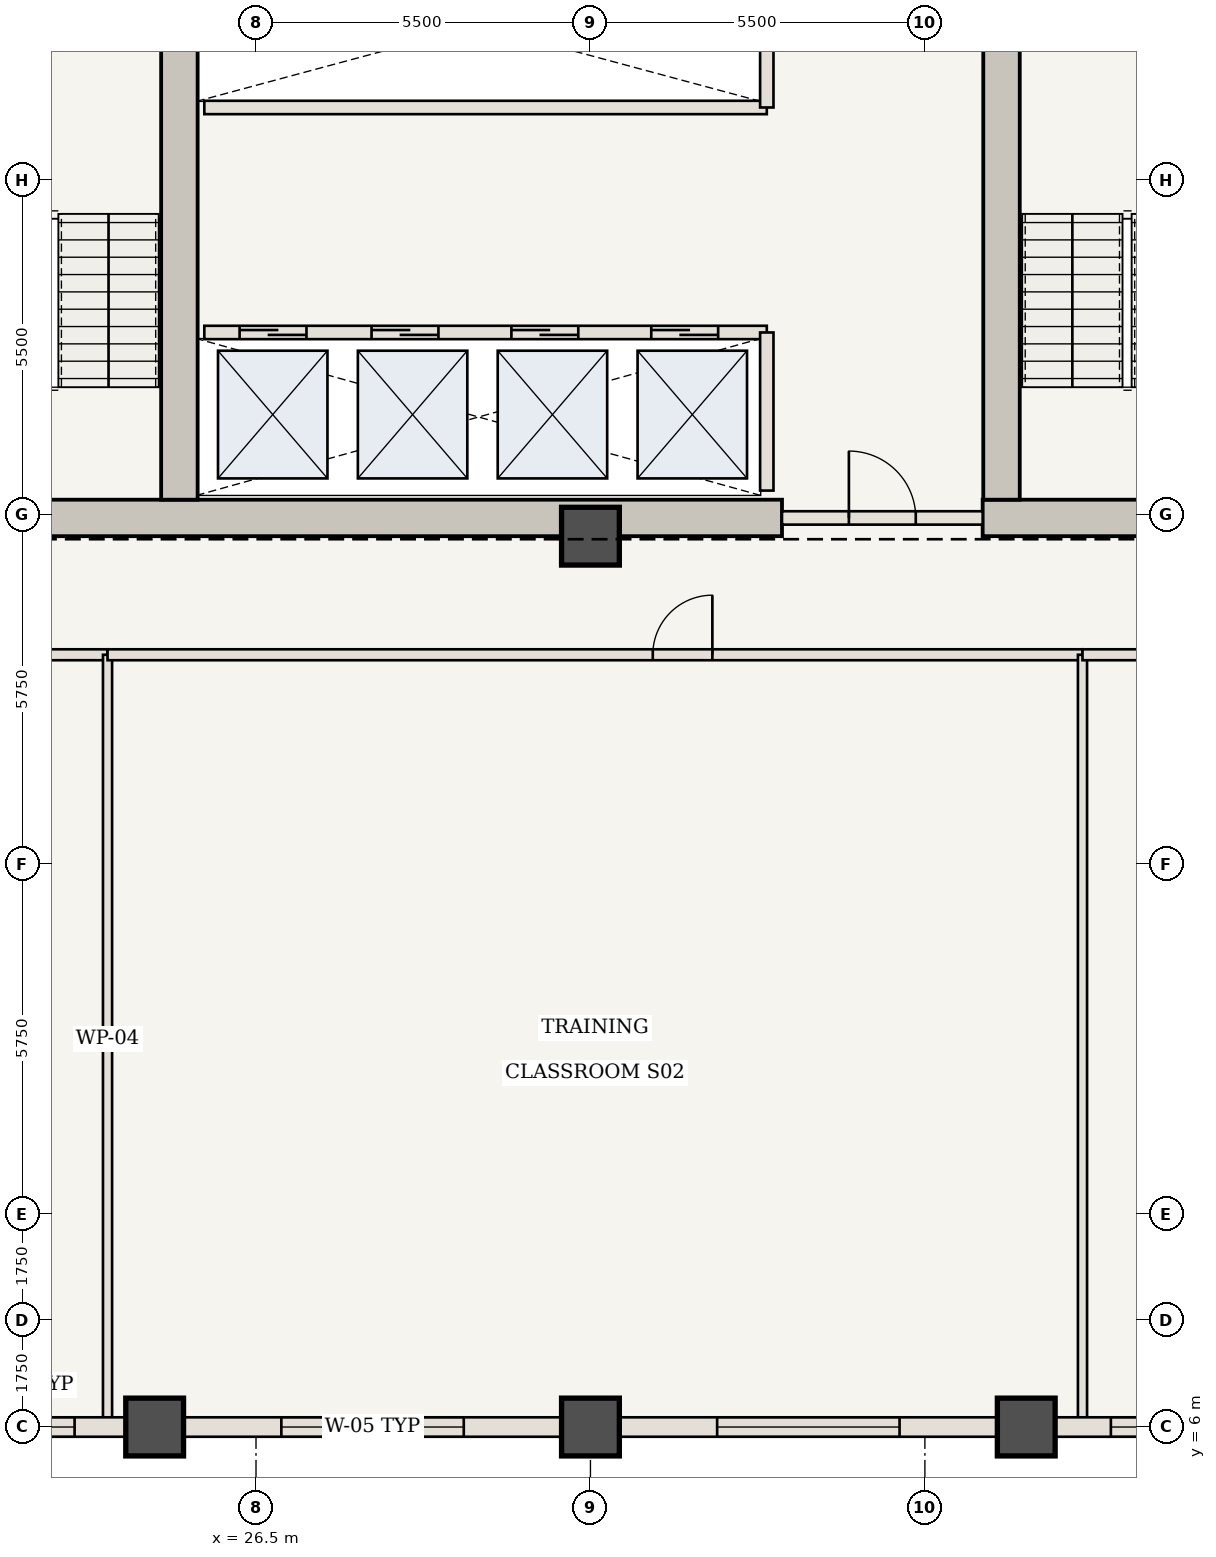
"""IFC4 building model, lengths in metres.
Left out: names, types, materials, properties, quantities, classifications, styles, units other than length and angle.
Written with IfcOpenShell. Run it as: python <this file> out.ifc"""

import sys

from ifc_helpers import new_model, si_unit, direction, frame, frame_2d, origin, origin_2d, place, context, subcontext, project, spatial, rectangle, extrude, element, fill, save


model = new_model("IFC4")
c1 = context("Model", 3, precision=1e-05, world=origin(), true_north=direction((0.0, 1.0)))
c2 = subcontext(c1, "Body", "Model", "MODEL_VIEW")
j1 = project(units=[si_unit("LENGTHUNIT", "METRE"), si_unit("PLANEANGLEUNIT", "RADIAN")], contexts=[c1])
p1 = place(None, origin())
s1 = spatial("IfcSite", under=j1, at=p1, CompositionType="ELEMENT")
p2 = place(p1, origin())
s2 = spatial("IfcBuilding", under=s1, at=p2, CompositionType="ELEMENT")
p3 = place(p2, frame((0.0, 0.0, 133.7)))
s3 = spatial("IfcBuildingStorey", under=s2, at=p3, CompositionType="ELEMENT", Elevation=133.7)
p4 = place(p3, frame((21.41, 20.95, 0.0), z_axis=(0.0, 0.0, 1.0), x_axis=(1.0, 0.0, 0.0)))
e1 = element("IfcWall", 1, at=p4, inside=s3, PredefinedType="SHEAR", context=c2, shape_type="SweptSolid", body=[
    extrude(rectangle(XDim=13.74, YDim=0.6, at=frame_2d((6.87, 0.0))), origin(), (0.0, 0.0, 1.0), 3.85),
])
p5 = place(p3, frame((38.45, 20.95, 0.0), z_axis=(0.0, 0.0, 1.0), x_axis=(1.0, 0.0, 0.0)))
e2 = element("IfcWall", 2, at=p5, inside=s3, PredefinedType="SHEAR", context=c2, shape_type="SweptSolid", body=[
    extrude(rectangle(XDim=4.14, YDim=0.6, at=frame_2d((2.07, 0.0))), origin(), (0.0, 0.0, 1.0), 3.85),
])
for number, where, z_axis, x_axis in (
    (3, (25.24, 21.25, 0.0), (0.0, 0.0, 1.0), (0.0, 1.0, 0.0)),
    (4, (38.76, 21.25, 0.0), (0.0, 0.0, 1.0), (0.0, 1.0, 0.0)),
):
    element("IfcWall", number, at=place(p3, frame(where, z_axis=z_axis, x_axis=x_axis)), inside=s3, PredefinedType="SHEAR", context=c2, shape_type="SweptSolid", body=[
        extrude(rectangle(XDim=9.35, YDim=0.6, at=frame_2d((4.675, 0.0))), origin(), (0.0, 0.0, 1.0), 3.85),
    ])
for number, where, z_axis, x_axis in (
    (5, (32.0, 20.65, 0.0), (0.0, 0.0, 1.0), (1.0, 0.0, 0.0)),
    (6, (24.833, 6.0, 0.0), (0.0, 0.0, 1.0), (1.0, 0.0, 0.0)),
    (7, (32.0, 6.0, 0.0), (0.0, 0.0, 1.0), (1.0, 0.0, 0.0)),
    (8, (39.167, 6.0, 0.0), (0.0, 0.0, 1.0), (1.0, 0.0, 0.0)),
):
    element("IfcColumn", number, at=place(p3, frame(where, z_axis=z_axis, x_axis=x_axis)), inside=s3, PredefinedType="COLUMN", context=c2, shape_type="SweptSolid", body=[
        extrude(rectangle(XDim=0.95, YDim=0.95, at=origin_2d()), origin(), (0.0, 0.0, 1.0), 3.85),
    ])
p6 = place(p3, frame((35.15, 20.95, 0.0), z_axis=(0.0, 0.0, 1.0), x_axis=(1.0, 0.0, 0.0)))
e9 = element("IfcWall", 9, at=p6, inside=s3, PredefinedType="STANDARD", context=c2, shape_type="SweptSolid", body=[
    extrude(rectangle(XDim=3.3, YDim=0.22, at=frame_2d((1.65, 0.0))), origin(), (0.0, 0.0, 1.0), 3.685),
])
p7 = place(p6, frame((1.1, 0.0, 0.0)))
e10 = element("IfcOpeningElement", 10, at=p7, cuts=e9, PredefinedType="OPENING", context=c2, shape_type="SweptSolid", body=[
    extrude(rectangle(XDim=1.1, YDim=2.15, at=frame_2d((0.55, 1.075))), frame((0.0, 0.12, 0.0), z_axis=(0.0, -1.0, 0.0), x_axis=(1.0, 0.0, 0.0)), (0.0, 0.0, 1.0), 0.24),
])
p8 = place(p3, frame((25.65, 24.0, 0.0), z_axis=(0.0, 0.0, 1.0), x_axis=(1.0, 0.0, 0.0)))
e11 = element("IfcWall", 11, at=p8, inside=s3, PredefinedType="STANDARD", context=c2, shape_type="SweptSolid", body=[
    extrude(rectangle(XDim=9.25, YDim=0.22, at=frame_2d((4.625, 0.0))), origin(), (0.0, 0.0, 1.0), 3.685),
])
p9 = place(p8, frame((0.58, 0.0, 0.0)))
e12 = element("IfcOpeningElement", 12, at=p9, cuts=e11, PredefinedType="OPENING", context=c2, shape_type="SweptSolid", body=[
    extrude(rectangle(XDim=1.1, YDim=2.15, at=frame_2d((0.55, 1.075))), frame((0.0, 0.12, 0.0), z_axis=(0.0, -1.0, 0.0), x_axis=(1.0, 0.0, 0.0)), (0.0, 0.0, 1.0), 0.24),
])
p10 = place(p8, frame((2.75, 0.0, 0.0)))
e13 = element("IfcOpeningElement", 13, at=p10, cuts=e11, PredefinedType="OPENING", context=c2, shape_type="SweptSolid", body=[
    extrude(rectangle(XDim=1.1, YDim=2.15, at=frame_2d((0.55, 1.075))), frame((0.0, 0.12, 0.0), z_axis=(0.0, -1.0, 0.0), x_axis=(1.0, 0.0, 0.0)), (0.0, 0.0, 1.0), 0.24),
])
p11 = place(p8, frame((5.05, 0.0, 0.0)))
e14 = element("IfcOpeningElement", 14, at=p11, cuts=e11, PredefinedType="OPENING", context=c2, shape_type="SweptSolid", body=[
    extrude(rectangle(XDim=1.1, YDim=2.15, at=frame_2d((0.55, 1.075))), frame((0.0, 0.12, 0.0), z_axis=(0.0, -1.0, 0.0), x_axis=(1.0, 0.0, 0.0)), (0.0, 0.0, 1.0), 0.24),
])
p12 = place(p8, frame((7.35, 0.0, 0.0)))
e15 = element("IfcOpeningElement", 15, at=p12, cuts=e11, PredefinedType="OPENING", context=c2, shape_type="SweptSolid", body=[
    extrude(rectangle(XDim=1.1, YDim=2.15, at=frame_2d((0.55, 1.075))), frame((0.0, 0.12, 0.0), z_axis=(0.0, -1.0, 0.0), x_axis=(1.0, 0.0, 0.0)), (0.0, 0.0, 1.0), 0.24),
])
p13 = place(p3, frame((34.9, 21.4, 0.0), z_axis=(0.0, 0.0, 1.0), x_axis=(0.0, 1.0, 0.0)))
e16 = element("IfcWall", 16, at=p13, inside=s3, PredefinedType="STANDARD", context=c2, shape_type="SweptSolid", body=[
    extrude(rectangle(XDim=2.6, YDim=0.22, at=frame_2d((1.3, 0.0))), origin(), (0.0, 0.0, 1.0), 3.685),
])
p14 = place(p3, frame((25.65, 27.7, 0.0), z_axis=(0.0, 0.0, 1.0), x_axis=(1.0, 0.0, 0.0)))
e17 = element("IfcWall", 17, at=p14, inside=s3, PredefinedType="STANDARD", context=c2, shape_type="SweptSolid", body=[
    extrude(rectangle(XDim=9.25, YDim=0.22, at=frame_2d((4.625, 0.0))), origin(), (0.0, 0.0, 1.0), 3.685),
])
p15 = place(p3, frame((34.9, 27.7, 0.0), z_axis=(0.0, 0.0, 1.0), x_axis=(0.0, 1.0, 0.0)))
e18 = element("IfcWall", 18, at=p15, inside=s3, PredefinedType="STANDARD", context=c2, shape_type="SweptSolid", body=[
    extrude(rectangle(XDim=2.7, YDim=0.22, at=frame_2d((1.35, 0.0))), origin(), (0.0, 0.0, 1.0), 3.685),
])
p16 = place(p3, frame((10.5, 18.7, 0.0), z_axis=(0.0, 0.0, 1.0), x_axis=(1.0, 0.0, 0.0)))
e19 = element("IfcWall", 19, at=p16, inside=s3, PredefinedType="STANDARD", context=c2, shape_type="SweptSolid", body=[
    extrude(rectangle(XDim=13.558, YDim=0.18, at=frame_2d((6.779, 0.0))), origin(), (0.0, 0.0, 1.0), 3.685),
])
p17 = place(p16, frame((6.279, 0.0, 0.0)))
e20 = element("IfcOpeningElement", 20, at=p17, cuts=e19, PredefinedType="OPENING", context=c2, shape_type="SweptSolid", body=[
    extrude(rectangle(XDim=0.98, YDim=2.2, at=frame_2d((0.49, 1.1))), frame((0.0, 0.1, 0.0), z_axis=(0.0, -1.0, 0.0), x_axis=(1.0, 0.0, 0.0)), (0.0, 0.0, 1.0), 0.2),
])
p18 = place(p3, frame((24.058, 6.06, 0.0), z_axis=(0.0, 0.0, 1.0), x_axis=(0.0, 1.0, 0.0)))
e21 = element("IfcWall", 21, at=p18, inside=s3, PredefinedType="STANDARD", context=c2, shape_type="SweptSolid", body=[
    extrude(rectangle(XDim=12.64, YDim=0.15, at=frame_2d((6.32, 0.0))), origin(), (0.0, 0.0, 1.0), 3.685),
])
p19 = place(p3, frame((24.058, 18.7, 0.0), z_axis=(0.0, 0.0, 1.0), x_axis=(1.0, 0.0, 0.0)))
e22 = element("IfcWall", 22, at=p19, inside=s3, PredefinedType="STANDARD", context=c2, shape_type="SweptSolid", body=[
    extrude(rectangle(XDim=16.033, YDim=0.18, at=frame_2d((8.017, 0.0))), origin(), (0.0, 0.0, 1.0), 3.685),
])
p20 = place(p19, frame((8.967, 0.0, 0.0)))
e23 = element("IfcOpeningElement", 23, at=p20, cuts=e22, PredefinedType="OPENING", context=c2, shape_type="SweptSolid", body=[
    extrude(rectangle(XDim=0.98, YDim=2.2, at=frame_2d((0.49, 1.1))), frame((0.0, 0.1, 0.0), z_axis=(0.0, -1.0, 0.0), x_axis=(1.0, 0.0, 0.0)), (0.0, 0.0, 1.0), 0.2),
])
p21 = place(p3, frame((40.092, 6.06, 0.0), z_axis=(0.0, 0.0, 1.0), x_axis=(0.0, 1.0, 0.0)))
e24 = element("IfcWall", 24, at=p21, inside=s3, PredefinedType="STANDARD", context=c2, shape_type="SweptSolid", body=[
    extrude(rectangle(XDim=12.64, YDim=0.15, at=frame_2d((6.32, 0.0))), origin(), (0.0, 0.0, 1.0), 3.685),
])
p22 = place(p3, frame((40.092, 18.7, 0.0), z_axis=(0.0, 0.0, 1.0), x_axis=(1.0, 0.0, 0.0)))
e25 = element("IfcWall", 25, at=p22, inside=s3, PredefinedType="STANDARD", context=c2, shape_type="SweptSolid", body=[
    extrude(rectangle(XDim=13.408, YDim=0.18, at=frame_2d((6.704, 0.0))), origin(), (0.0, 0.0, 1.0), 3.685),
])
p23 = place(p22, frame((6.204, 0.0, 0.0)))
e26 = element("IfcOpeningElement", 26, at=p23, cuts=e25, PredefinedType="OPENING", context=c2, shape_type="SweptSolid", body=[
    extrude(rectangle(XDim=0.98, YDim=2.2, at=frame_2d((0.49, 1.1))), frame((0.0, 0.1, 0.0), z_axis=(0.0, -1.0, 0.0), x_axis=(1.0, 0.0, 0.0)), (0.0, 0.0, 1.0), 0.2),
])
p24 = place(p3, frame((24.833, 6.0, 0.0), z_axis=(0.0, 0.0, 1.0), x_axis=(-1.0, 0.0, 0.0)))
e27 = element("IfcWall", 27, at=p24, inside=s3, PredefinedType="USERDEFINED", context=c2, shape_type="SweptSolid", body=[
    extrude(rectangle(XDim=7.167, YDim=0.32, at=frame_2d((3.583, 0.0))), origin(), (0.0, 0.0, 1.0), 2.885),
])
p25 = place(p24, frame((1.317, 0.0, 0.85)))
e28 = element("IfcOpeningElement", 28, at=p25, cuts=e27, PredefinedType="OPENING", context=c2, shape_type="SweptSolid", body=[
    extrude(rectangle(XDim=1.6, YDim=1.835, at=frame_2d((0.8, 0.917))), frame((0.0, 0.17, 0.0), z_axis=(0.0, -1.0, 0.0), x_axis=(1.0, 0.0, 0.0)), (0.0, 0.0, 1.0), 0.34),
])
p26 = place(p24, frame((4.175, 0.0, 0.85)))
e29 = element("IfcOpeningElement", 29, at=p26, cuts=e27, PredefinedType="OPENING", context=c2, shape_type="SweptSolid", body=[
    extrude(rectangle(XDim=2.2, YDim=1.835, at=frame_2d((1.1, 0.917))), frame((0.0, 0.17, 0.0), z_axis=(0.0, -1.0, 0.0), x_axis=(1.0, 0.0, 0.0)), (0.0, 0.0, 1.0), 0.34),
])
p27 = place(p3, frame((32.0, 6.0, 0.0), z_axis=(0.0, 0.0, 1.0), x_axis=(-1.0, 0.0, 0.0)))
e30 = element("IfcWall", 30, at=p27, inside=s3, PredefinedType="USERDEFINED", context=c2, shape_type="SweptSolid", body=[
    extrude(rectangle(XDim=7.167, YDim=0.32, at=frame_2d((3.583, 0.0))), origin(), (0.0, 0.0, 1.0), 2.885),
])
p28 = place(p27, frame((2.083, 0.0, 0.85)))
e31 = element("IfcOpeningElement", 31, at=p28, cuts=e30, PredefinedType="OPENING", context=c2, shape_type="SweptSolid", body=[
    extrude(rectangle(XDim=3.0, YDim=1.835, at=frame_2d((1.5, 0.917))), frame((0.0, 0.17, 0.0), z_axis=(0.0, -1.0, 0.0), x_axis=(1.0, 0.0, 0.0)), (0.0, 0.0, 1.0), 0.34),
])
p29 = place(p3, frame((39.167, 6.0, 0.0), z_axis=(0.0, 0.0, 1.0), x_axis=(-1.0, 0.0, 0.0)))
e32 = element("IfcWall", 32, at=p29, inside=s3, PredefinedType="USERDEFINED", context=c2, shape_type="SweptSolid", body=[
    extrude(rectangle(XDim=7.167, YDim=0.32, at=frame_2d((3.583, 0.0))), origin(), (0.0, 0.0, 1.0), 2.885),
])
p30 = place(p29, frame((2.083, 0.0, 0.85)))
e33 = element("IfcOpeningElement", 33, at=p30, cuts=e32, PredefinedType="OPENING", context=c2, shape_type="SweptSolid", body=[
    extrude(rectangle(XDim=3.0, YDim=1.835, at=frame_2d((1.5, 0.917))), frame((0.0, 0.17, 0.0), z_axis=(0.0, -1.0, 0.0), x_axis=(1.0, 0.0, 0.0)), (0.0, 0.0, 1.0), 0.34),
])
p31 = place(p3, frame((46.333, 6.0, 0.0), z_axis=(0.0, 0.0, 1.0), x_axis=(-1.0, 0.0, 0.0)))
e34 = element("IfcWall", 34, at=p31, inside=s3, PredefinedType="USERDEFINED", context=c2, shape_type="SweptSolid", body=[
    extrude(rectangle(XDim=7.167, YDim=0.32, at=frame_2d((3.583, 0.0))), origin(), (0.0, 0.0, 1.0), 2.885),
])
p32 = place(p31, frame((0.792, 0.0, 0.85)))
e35 = element("IfcOpeningElement", 35, at=p32, cuts=e34, PredefinedType="OPENING", context=c2, shape_type="SweptSolid", body=[
    extrude(rectangle(XDim=2.2, YDim=1.835, at=frame_2d((1.1, 0.917))), frame((0.0, 0.17, 0.0), z_axis=(0.0, -1.0, 0.0), x_axis=(1.0, 0.0, 0.0)), (0.0, 0.0, 1.0), 0.34),
])
p33 = place(p31, frame((4.175, 0.0, 0.85)))
e36 = element("IfcOpeningElement", 36, at=p33, cuts=e34, PredefinedType="OPENING", context=c2, shape_type="SweptSolid", body=[
    extrude(rectangle(XDim=1.6, YDim=1.835, at=frame_2d((0.8, 0.917))), frame((0.0, 0.17, 0.0), z_axis=(0.0, -1.0, 0.0), x_axis=(1.0, 0.0, 0.0)), (0.0, 0.0, 1.0), 0.34),
])
p34 = place(p7, origin())
e37 = element("IfcDoor", 37, at=p34, inside=s3, OperationType="SINGLE_SWING_LEFT", PredefinedType="DOOR", context=c2, shape_type="SweptSolid", body=[
    extrude(rectangle(XDim=1.1, YDim=2.15, at=frame_2d((0.55, 1.075))), frame((0.0, 0.025, 0.0), z_axis=(0.0, -1.0, 0.0), x_axis=(1.0, 0.0, 0.0)), (0.0, 0.0, 1.0), 0.05),
])
fill(e10, e37)
p35 = place(p9, origin())
e38 = element("IfcDoor", 38, at=p35, inside=s3, OperationType="DOUBLE_DOOR_SLIDING", PredefinedType="DOOR", context=c2, shape_type="SweptSolid", body=[
    extrude(rectangle(XDim=1.1, YDim=2.15, at=frame_2d((0.55, 1.075))), frame((0.0, 0.025, 0.0), z_axis=(0.0, -1.0, 0.0), x_axis=(1.0, 0.0, 0.0)), (0.0, 0.0, 1.0), 0.05),
])
fill(e12, e38)
p36 = place(p10, origin())
e39 = element("IfcDoor", 39, at=p36, inside=s3, OperationType="DOUBLE_DOOR_SLIDING", PredefinedType="DOOR", context=c2, shape_type="SweptSolid", body=[
    extrude(rectangle(XDim=1.1, YDim=2.15, at=frame_2d((0.55, 1.075))), frame((0.0, 0.025, 0.0), z_axis=(0.0, -1.0, 0.0), x_axis=(1.0, 0.0, 0.0)), (0.0, 0.0, 1.0), 0.05),
])
fill(e13, e39)
p37 = place(p11, origin())
e40 = element("IfcDoor", 40, at=p37, inside=s3, OperationType="DOUBLE_DOOR_SLIDING", PredefinedType="DOOR", context=c2, shape_type="SweptSolid", body=[
    extrude(rectangle(XDim=1.1, YDim=2.15, at=frame_2d((0.55, 1.075))), frame((0.0, 0.025, 0.0), z_axis=(0.0, -1.0, 0.0), x_axis=(1.0, 0.0, 0.0)), (0.0, 0.0, 1.0), 0.05),
])
fill(e14, e40)
p38 = place(p12, origin())
e41 = element("IfcDoor", 41, at=p38, inside=s3, OperationType="DOUBLE_DOOR_SLIDING", PredefinedType="DOOR", context=c2, shape_type="SweptSolid", body=[
    extrude(rectangle(XDim=1.1, YDim=2.15, at=frame_2d((0.55, 1.075))), frame((0.0, 0.025, 0.0), z_axis=(0.0, -1.0, 0.0), x_axis=(1.0, 0.0, 0.0)), (0.0, 0.0, 1.0), 0.05),
])
fill(e15, e41)
p39 = place(p20, origin())
e42 = element("IfcDoor", 42, at=p39, inside=s3, OperationType="SINGLE_SWING_RIGHT", PredefinedType="DOOR", context=c2, shape_type="SweptSolid", body=[
    extrude(rectangle(XDim=0.98, YDim=2.2, at=frame_2d((0.49, 1.1))), frame((0.0, 0.025, 0.0), z_axis=(0.0, -1.0, 0.0), x_axis=(1.0, 0.0, 0.0)), (0.0, 0.0, 1.0), 0.05),
])
fill(e23, e42)
p40 = place(p25, origin())
e43 = element("IfcWindow", 43, at=p40, inside=s3, PartitioningType="SINGLE_PANEL", PredefinedType="WINDOW", context=c2, shape_type="SweptSolid", body=[
    extrude(rectangle(XDim=1.6, YDim=1.835, at=frame_2d((0.8, 0.917))), frame((0.0, 0.03, 0.0), z_axis=(0.0, -1.0, 0.0), x_axis=(1.0, 0.0, 0.0)), (0.0, 0.0, 1.0), 0.06),
])
fill(e28, e43)
p41 = place(p28, origin())
e44 = element("IfcWindow", 44, at=p41, inside=s3, PartitioningType="SINGLE_PANEL", PredefinedType="WINDOW", context=c2, shape_type="SweptSolid", body=[
    extrude(rectangle(XDim=3.0, YDim=1.835, at=frame_2d((1.5, 0.917))), frame((0.0, 0.03, 0.0), z_axis=(0.0, -1.0, 0.0), x_axis=(1.0, 0.0, 0.0)), (0.0, 0.0, 1.0), 0.06),
])
fill(e31, e44)
p42 = place(p30, origin())
e45 = element("IfcWindow", 45, at=p42, inside=s3, PartitioningType="SINGLE_PANEL", PredefinedType="WINDOW", context=c2, shape_type="SweptSolid", body=[
    extrude(rectangle(XDim=3.0, YDim=1.835, at=frame_2d((1.5, 0.917))), frame((0.0, 0.03, 0.0), z_axis=(0.0, -1.0, 0.0), x_axis=(1.0, 0.0, 0.0)), (0.0, 0.0, 1.0), 0.06),
])
fill(e33, e45)
p43 = place(p33, origin())
e46 = element("IfcWindow", 46, at=p43, inside=s3, PartitioningType="SINGLE_PANEL", PredefinedType="WINDOW", context=c2, shape_type="SweptSolid", body=[
    extrude(rectangle(XDim=1.6, YDim=1.835, at=frame_2d((0.8, 0.917))), frame((0.0, 0.03, 0.0), z_axis=(0.0, -1.0, 0.0), x_axis=(1.0, 0.0, 0.0)), (0.0, 0.0, 1.0), 0.06),
])
fill(e36, e46)
save(model, sys.argv[1])
